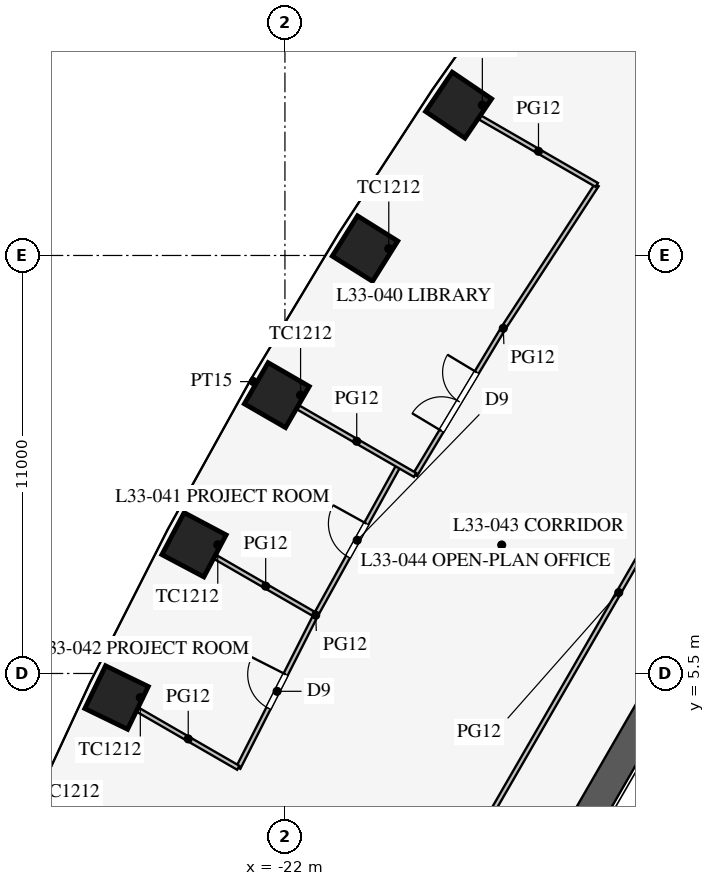
"""IFC4 building model, lengths in metres.
Left out: names, types, materials, properties, quantities, classifications, styles, units other than length and angle.
Written with IfcOpenShell. Run it as: python <this file> out.ifc"""

import sys

from ifc_helpers import new_model, si_unit, direction, frame, frame_2d, origin, origin_2d, place, context, subcontext, project, spatial, rectangle, extrude, element, fill, save


model = new_model("IFC4")
c1 = context("Model", 3, precision=1e-05, world=origin(), true_north=direction((0.0, 1.0)))
c2 = subcontext(c1, "Body", "Model", "MODEL_VIEW")
j1 = project(units=[si_unit("LENGTHUNIT", "METRE"), si_unit("PLANEANGLEUNIT", "RADIAN")], contexts=[c1])
p1 = place(None, origin())
s1 = spatial("IfcSite", under=j1, at=p1, CompositionType="ELEMENT")
p2 = place(p1, origin())
s2 = spatial("IfcBuilding", under=s1, at=p2, CompositionType="ELEMENT")
p3 = place(p2, frame((0.0, 0.0, 145.1)))
s3 = spatial("IfcBuildingStorey", under=s2, at=p3, CompositionType="ELEMENT", Elevation=145.1)
for number, where, z_axis, x_axis in (
    (1, (-17.43, 20.456, 0.0), (0.0, 0.0, 1.0), (-0.561, -0.828, 0.0)),
    (2, (-19.893, 16.681, 0.0), (0.0, 0.0, 1.0), (-0.531, -0.847, 0.0)),
    (3, (-22.213, 12.825, 0.0), (0.0, 0.0, 1.0), (-0.5, -0.866, 0.0)),
    (4, (-24.393, 8.887, 0.0), (0.0, 0.0, 1.0), (-0.468, -0.883, 0.0)),
    (5, (-26.43, 4.867, 0.0), (0.0, 0.0, 1.0), (-0.436, -0.9, 0.0)),
):
    element("IfcColumn", number, at=place(p3, frame(where, z_axis=z_axis, x_axis=x_axis)), inside=s3, PredefinedType="COLUMN", context=c2, shape_type="SweptSolid", body=[
        extrude(rectangle(XDim=1.25, YDim=1.25, at=origin_2d()), origin(), (0.0, 0.0, 1.0), 4.2),
    ])
p4 = place(p3, frame((-5.773, 16.0, 0.0), z_axis=(0.0, 0.0, 1.0), x_axis=(-0.500002442456, -0.866023993627, 0.0)))
e6 = element("IfcWall", 6, at=p4, inside=s3, PredefinedType="SHEAR", context=c2, shape_type="SweptSolid", body=[
    extrude(rectangle(XDim=21.939, YDim=0.8, at=frame_2d((10.97, 0.0))), origin(), (0.0, 0.0, 1.0), 4.2),
])
p5 = place(p4, frame((17.27, 0.0, 0.0)))
e7 = element("IfcOpeningElement", 7, at=p5, cuts=e6, PredefinedType="OPENING", context=c2, shape_type="SweptSolid", body=[
    extrude(rectangle(XDim=1.2, YDim=2.1, at=frame_2d((0.6, 1.05))), frame((0.0, 0.41, 0.0), z_axis=(0.0, -1.0, 0.0), x_axis=(1.0, 0.0, 0.0)), (0.0, 0.0, 1.0), 0.82),
])
p6 = place(p4, frame((3.47, 0.0, 0.0)))
e8 = element("IfcOpeningElement", 8, at=p6, cuts=e6, PredefinedType="OPENING", context=c2, shape_type="SweptSolid", body=[
    extrude(rectangle(XDim=1.2, YDim=2.1, at=frame_2d((0.6, 1.05))), frame((0.0, 0.41, 0.0), z_axis=(0.0, -1.0, 0.0), x_axis=(1.0, 0.0, 0.0)), (0.0, 0.0, 1.0), 0.82),
])
p7 = place(p3, frame((-0.016, 30.491, 0.0), z_axis=(0.0, 0.0, 1.0), x_axis=(-0.50000091641, -0.866024874695, 0.0)))
e9 = element("IfcWall", 9, at=p7, inside=s3, PredefinedType="PARTITIONING", context=c2, shape_type="SweptSolid", body=[
    extrude(rectangle(XDim=52.796, YDim=0.12, at=frame_2d((26.398, 0.0))), origin(), (0.0, 0.0, 1.0), 2.9),
])
p8 = place(p7, frame((10.2, 0.0, 0.15)))
e10 = element("IfcOpeningElement", 10, at=p8, cuts=e9, PredefinedType="OPENING", context=c2, shape_type="SweptSolid", body=[
    extrude(rectangle(XDim=1.8, YDim=2.1, at=frame_2d((0.9, 1.05))), frame((0.0, 0.07, 0.0), z_axis=(0.0, -1.0, 0.0), x_axis=(1.0, 0.0, 0.0)), (0.0, 0.0, 1.0), 0.14),
])
p9 = place(p7, frame((40.8, 0.0, 0.15)))
e11 = element("IfcOpeningElement", 11, at=p9, cuts=e9, PredefinedType="OPENING", context=c2, shape_type="SweptSolid", body=[
    extrude(rectangle(XDim=1.8, YDim=2.1, at=frame_2d((0.9, 1.05))), frame((0.0, 0.07, 0.0), z_axis=(0.0, -1.0, 0.0), x_axis=(1.0, 0.0, 0.0)), (0.0, 0.0, 1.0), 0.14),
])
p10 = place(p3, frame((-22.758, 13.139, 0.0), z_axis=(0.0, 0.0, 1.0), x_axis=(-0.866063163075, 0.499934593286, 0.0)))
e12 = element("IfcWall", 12, at=p10, inside=s3, PredefinedType="PARTITIONING", context=c2, shape_type="SweptSolid", body=[
    extrude(rectangle(XDim=0.166, YDim=0.15, at=frame_2d((0.083, 0.0))), origin(), (0.0, 0.0, 1.0), 2.9),
])
p11 = place(p3, frame((-19.009, 10.975, 0.0), z_axis=(0.0, 0.0, 1.0), x_axis=(-0.484292898211, -0.874905931368, 0.0)))
e13 = element("IfcWall", 13, at=p11, inside=s3, PredefinedType="PARTITIONING", context=c2, shape_type="SweptSolid", body=[
    extrude(rectangle(XDim=4.501, YDim=0.12, at=frame_2d((2.25, 0.0))), origin(), (0.0, 0.0, 1.0), 2.9),
])
p12 = place(p11, frame((1.75, 0.0, 0.15)))
e14 = element("IfcOpeningElement", 14, at=p12, cuts=e13, PredefinedType="OPENING", context=c2, shape_type="SweptSolid", body=[
    extrude(rectangle(XDim=1.0, YDim=2.1, at=frame_2d((0.5, 1.05))), frame((0.0, 0.07, 0.0), z_axis=(0.0, -1.0, 0.0), x_axis=(1.0, 0.0, 0.0)), (0.0, 0.0, 1.0), 0.14),
])
p13 = place(p3, frame((-21.189, 7.037, 0.0), z_axis=(0.0, 0.0, 1.0), x_axis=(-0.452471679136, -0.891778772779, 0.0)))
e15 = element("IfcWall", 15, at=p13, inside=s3, PredefinedType="PARTITIONING", context=c2, shape_type="SweptSolid", body=[
    extrude(rectangle(XDim=4.507, YDim=0.12, at=frame_2d((2.253, 0.0))), origin(), (0.0, 0.0, 1.0), 2.9),
])
p14 = place(p13, frame((1.75, 0.0, 0.15)))
e16 = element("IfcOpeningElement", 16, at=p14, cuts=e15, PredefinedType="OPENING", context=c2, shape_type="SweptSolid", body=[
    extrude(rectangle(XDim=1.0, YDim=2.1, at=frame_2d((0.5, 1.05))), frame((0.0, 0.07, 0.0), z_axis=(0.0, -1.0, 0.0), x_axis=(1.0, 0.0, 0.0)), (0.0, 0.0, 1.0), 0.14),
])
p15 = place(p3, frame((-16.256, 14.581, 0.0), z_axis=(0.0, 0.0, 1.0), x_axis=(-0.515548366618, -0.856860479703, 0.0)))
e17 = element("IfcWall", 17, at=p15, inside=s3, PredefinedType="PARTITIONING", context=c2, shape_type="SweptSolid", body=[
    extrude(rectangle(XDim=4.501, YDim=0.12, at=frame_2d((2.25, 0.0))), origin(), (0.0, 0.0, 1.0), 2.9),
])
p16 = place(p15, frame((1.35, 0.0, 0.15)))
e18 = element("IfcOpeningElement", 18, at=p16, cuts=e17, PredefinedType="OPENING", context=c2, shape_type="SweptSolid", body=[
    extrude(rectangle(XDim=1.8, YDim=2.1, at=frame_2d((0.9, 1.05))), frame((0.0, 0.07, 0.0), z_axis=(0.0, -1.0, 0.0), x_axis=(1.0, 0.0, 0.0)), (0.0, 0.0, 1.0), 0.14),
])
p17 = place(p3, frame((-13.795, 18.357, 0.0), z_axis=(0.0, 0.0, 1.0), x_axis=(-0.546069464151, -0.837739900161, 0.0)))
e19 = element("IfcWall", 19, at=p17, inside=s3, PredefinedType="PARTITIONING", context=c2, shape_type="SweptSolid", body=[
    extrude(rectangle(XDim=4.507, YDim=0.12, at=frame_2d((2.253, 0.0))), origin(), (0.0, 0.0, 1.0), 2.9),
])
p18 = place(p3, frame((-18.576, 10.725, 0.0), z_axis=(0.0, 0.0, 1.0), x_axis=(-0.866030760678, 0.499990721473, 0.0)))
e20 = element("IfcWall", 20, at=p18, inside=s3, PredefinedType="PARTITIONING", context=c2, shape_type="SweptSolid", body=[
    extrude(rectangle(XDim=3.545, YDim=0.12, at=frame_2d((1.772, 0.0))), origin(), (0.0, 0.0, 1.0), 2.9),
])
p19 = place(p3, frame((-21.189, 7.037, 0.0), z_axis=(0.0, 0.0, 1.0), x_axis=(-0.86603332906, 0.499986272769, 0.0)))
e21 = element("IfcWall", 21, at=p19, inside=s3, PredefinedType="PARTITIONING", context=c2, shape_type="SweptSolid", body=[
    extrude(rectangle(XDim=3.044, YDim=0.12, at=frame_2d((1.522, 0.0))), origin(), (0.0, 0.0, 1.0), 2.9),
])
p20 = place(p3, frame((-23.228, 3.018, 0.0), z_axis=(0.0, 0.0, 1.0), x_axis=(-0.866041209536, 0.499972622635, 0.0)))
e22 = element("IfcWall", 22, at=p20, inside=s3, PredefinedType="PARTITIONING", context=c2, shape_type="SweptSolid", body=[
    extrude(rectangle(XDim=3.041, YDim=0.12, at=frame_2d((1.521, 0.0))), origin(), (0.0, 0.0, 1.0), 2.9),
])
p21 = place(p3, frame((-13.795, 18.357, 0.0), z_axis=(0.0, 0.0, 1.0), x_axis=(-0.866045526189, 0.499965145353, 0.0)))
e23 = element("IfcWall", 23, at=p21, inside=s3, PredefinedType="PARTITIONING", context=c2, shape_type="SweptSolid", body=[
    extrude(rectangle(XDim=3.541, YDim=0.12, at=frame_2d((1.771, 0.0))), origin(), (0.0, 0.0, 1.0), 2.9),
])
p22 = place(p16, frame((1.8, 0.0, 0.0), z_axis=(0.0, 0.0, 1.0), x_axis=(-1.0, 0.0, 0.0)))
e24 = element("IfcDoor", 24, at=p22, inside=s3, OperationType="DOUBLE_DOOR_SINGLE_SWING", PredefinedType="DOOR", context=c2, shape_type="SweptSolid", body=[
    extrude(rectangle(XDim=1.8, YDim=2.1, at=frame_2d((0.9, 1.05))), frame((0.0, 0.025, 0.0), z_axis=(0.0, -1.0, 0.0), x_axis=(1.0, 0.0, 0.0)), (0.0, 0.0, 1.0), 0.05),
])
fill(e18, e24)
p23 = place(p12, frame((1.0, 0.0, 0.0), z_axis=(0.0, 0.0, 1.0), x_axis=(-1.0, 0.0, 0.0)))
e25 = element("IfcDoor", 25, at=p23, inside=s3, OperationType="SINGLE_SWING_RIGHT", PredefinedType="DOOR", context=c2, shape_type="SweptSolid", body=[
    extrude(rectangle(XDim=1.0, YDim=2.1, at=frame_2d((0.5, 1.05))), frame((0.0, 0.025, 0.0), z_axis=(0.0, -1.0, 0.0), x_axis=(1.0, 0.0, 0.0)), (0.0, 0.0, 1.0), 0.05),
])
fill(e14, e25)
p24 = place(p14, frame((1.0, 0.0, 0.0), z_axis=(0.0, 0.0, 1.0), x_axis=(-1.0, 0.0, 0.0)))
e26 = element("IfcDoor", 26, at=p24, inside=s3, OperationType="SINGLE_SWING_RIGHT", PredefinedType="DOOR", context=c2, shape_type="SweptSolid", body=[
    extrude(rectangle(XDim=1.0, YDim=2.1, at=frame_2d((0.5, 1.05))), frame((0.0, 0.025, 0.0), z_axis=(0.0, -1.0, 0.0), x_axis=(1.0, 0.0, 0.0)), (0.0, 0.0, 1.0), 0.05),
])
fill(e16, e26)
save(model, sys.argv[1])
